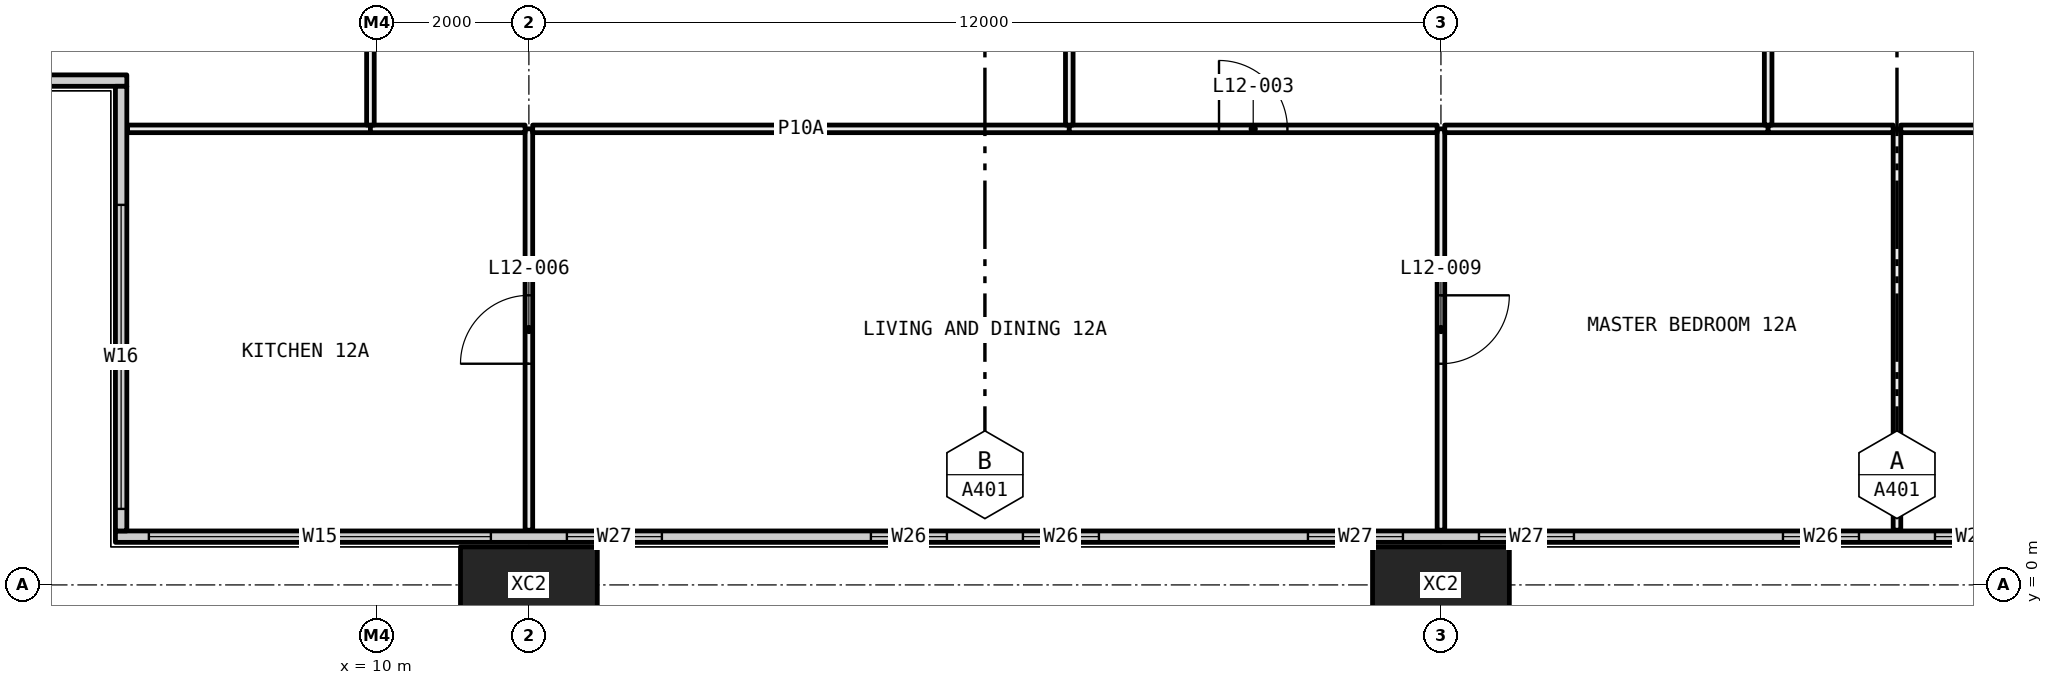
"""IFC4 building model, lengths in metres.
Left out: names, types, materials, properties, quantities, classifications, styles, units other than length and angle.
Written with IfcOpenShell. Run it as: python <this file> out.ifc"""

import sys

from ifc_helpers import new_model, si_unit, direction, frame, frame_2d, origin, origin_2d, place, context, subcontext, project, spatial, rectangle, hollow_rectangle, extrude, element, fill, save


model = new_model("IFC4")
c1 = context("Model", 3, precision=1e-05, world=origin(), true_north=direction((0.0, 1.0)))
c2 = subcontext(c1, "Body", "Model", "MODEL_VIEW")
j1 = project(units=[si_unit("LENGTHUNIT", "METRE"), si_unit("PLANEANGLEUNIT", "RADIAN")], contexts=[c1])
p1 = place(None, origin())
s1 = spatial("IfcSite", under=j1, at=p1, CompositionType="ELEMENT")
p2 = place(p1, origin())
s2 = spatial("IfcBuilding", under=s1, at=p2, CompositionType="ELEMENT")
p3 = place(p2, frame((0.0, 0.0, 54.15)))
s3 = spatial("IfcBuildingStorey", under=s2, at=p3, CompositionType="ELEMENT", Elevation=54.15)
for number, where, z_axis, x_axis in (
    (1, (12.0, 0.0, -0.4), (0.0, 0.0, 1.0), (1.0, 0.0, 0.0)),
    (2, (24.0, 0.0, -0.4), (0.0, 0.0, 1.0), (1.0, 0.0, 0.0)),
):
    element("IfcColumn", number, at=place(p3, frame(where, z_axis=z_axis, x_axis=x_axis)), inside=s3, PredefinedType="COLUMN", context=c2, shape_type="SweptSolid", body=[
        extrude(hollow_rectangle(XDim=1.8, YDim=1.0, WallThickness=0.07, at=origin_2d()), origin(), (0.0, 0.0, 1.0), 3.45),
    ])
p4 = place(p3, frame((6.56, 0.635, 0.0), z_axis=(0.0, 0.0, 1.0), x_axis=(1.0, 0.0, 0.0)))
e3 = element("IfcWall", 3, at=p4, inside=s3, PredefinedType="ELEMENTEDWALL", context=c2, shape_type="SweptSolid", body=[
    extrude(rectangle(XDim=58.88, YDim=0.15, at=frame_2d((29.44, 0.0))), origin(), (0.0, 0.0, 1.0), 3.05),
])
p5 = place(p4, frame((0.44, 0.0, 0.45)))
e4 = element("IfcOpeningElement", 4, at=p5, cuts=e3, PredefinedType="OPENING", context=c2, shape_type="SweptSolid", body=[
    extrude(rectangle(XDim=4.5, YDim=2.55, at=frame_2d((2.25, 1.275))), frame((0.0, 0.085, 0.0), z_axis=(0.0, -1.0, 0.0), x_axis=(1.0, 0.0, 0.0)), (0.0, 0.0, 1.0), 0.17),
])
p6 = place(p4, frame((5.94, 0.0, 0.45)))
e5 = element("IfcOpeningElement", 5, at=p6, cuts=e3, PredefinedType="OPENING", context=c2, shape_type="SweptSolid", body=[
    extrude(rectangle(XDim=1.25, YDim=2.55, at=frame_2d((0.625, 1.275))), frame((0.0, 0.085, 0.0), z_axis=(0.0, -1.0, 0.0), x_axis=(1.0, 0.0, 0.0)), (0.0, 0.0, 1.0), 0.17),
])
p7 = place(p4, frame((9.94, 0.0, 0.45)))
e6 = element("IfcOpeningElement", 6, at=p7, cuts=e3, PredefinedType="OPENING", context=c2, shape_type="SweptSolid", body=[
    extrude(rectangle(XDim=1.0, YDim=2.55, at=frame_2d((0.5, 1.275))), frame((0.0, 0.085, 0.0), z_axis=(0.0, -1.0, 0.0), x_axis=(1.0, 0.0, 0.0)), (0.0, 0.0, 1.0), 0.17),
])
p8 = place(p4, frame((11.94, 0.0, 0.45)))
e7 = element("IfcOpeningElement", 7, at=p8, cuts=e3, PredefinedType="OPENING", context=c2, shape_type="SweptSolid", body=[
    extrude(rectangle(XDim=1.0, YDim=2.55, at=frame_2d((0.5, 1.275))), frame((0.0, 0.085, 0.0), z_axis=(0.0, -1.0, 0.0), x_axis=(1.0, 0.0, 0.0)), (0.0, 0.0, 1.0), 0.17),
])
p9 = place(p4, frame((15.69, 0.0, 0.45)))
e8 = element("IfcOpeningElement", 8, at=p9, cuts=e3, PredefinedType="OPENING", context=c2, shape_type="SweptSolid", body=[
    extrude(rectangle(XDim=1.25, YDim=2.55, at=frame_2d((0.625, 1.275))), frame((0.0, 0.085, 0.0), z_axis=(0.0, -1.0, 0.0), x_axis=(1.0, 0.0, 0.0)), (0.0, 0.0, 1.0), 0.17),
])
p10 = place(p4, frame((17.94, 0.0, 0.45)))
e9 = element("IfcOpeningElement", 9, at=p10, cuts=e3, PredefinedType="OPENING", context=c2, shape_type="SweptSolid", body=[
    extrude(rectangle(XDim=1.25, YDim=2.55, at=frame_2d((0.625, 1.275))), frame((0.0, 0.085, 0.0), z_axis=(0.0, -1.0, 0.0), x_axis=(1.0, 0.0, 0.0)), (0.0, 0.0, 1.0), 0.17),
])
p11 = place(p4, frame((21.94, 0.0, 0.45)))
e10 = element("IfcOpeningElement", 10, at=p11, cuts=e3, PredefinedType="OPENING", context=c2, shape_type="SweptSolid", body=[
    extrude(rectangle(XDim=1.0, YDim=2.55, at=frame_2d((0.5, 1.275))), frame((0.0, 0.085, 0.0), z_axis=(0.0, -1.0, 0.0), x_axis=(1.0, 0.0, 0.0)), (0.0, 0.0, 1.0), 0.17),
])
p12 = place(p4, frame((23.94, 0.0, 0.45)))
e11 = element("IfcOpeningElement", 11, at=p12, cuts=e3, PredefinedType="OPENING", context=c2, shape_type="SweptSolid", body=[
    extrude(rectangle(XDim=1.0, YDim=2.55, at=frame_2d((0.5, 1.275))), frame((0.0, 0.085, 0.0), z_axis=(0.0, -1.0, 0.0), x_axis=(1.0, 0.0, 0.0)), (0.0, 0.0, 1.0), 0.17),
])
p13 = place(p4, frame((27.69, 0.0, 0.45)))
e12 = element("IfcOpeningElement", 12, at=p13, cuts=e3, PredefinedType="OPENING", context=c2, shape_type="SweptSolid", body=[
    extrude(rectangle(XDim=1.25, YDim=2.55, at=frame_2d((0.625, 1.275))), frame((0.0, 0.085, 0.0), z_axis=(0.0, -1.0, 0.0), x_axis=(1.0, 0.0, 0.0)), (0.0, 0.0, 1.0), 0.17),
])
p14 = place(p4, frame((29.94, 0.0, 0.45)))
e13 = element("IfcOpeningElement", 13, at=p14, cuts=e3, PredefinedType="OPENING", context=c2, shape_type="SweptSolid", body=[
    extrude(rectangle(XDim=1.25, YDim=2.55, at=frame_2d((0.625, 1.275))), frame((0.0, 0.085, 0.0), z_axis=(0.0, -1.0, 0.0), x_axis=(1.0, 0.0, 0.0)), (0.0, 0.0, 1.0), 0.17),
])
p15 = place(p4, frame((33.94, 0.0, 0.45)))
e14 = element("IfcOpeningElement", 14, at=p15, cuts=e3, PredefinedType="OPENING", context=c2, shape_type="SweptSolid", body=[
    extrude(rectangle(XDim=1.0, YDim=2.55, at=frame_2d((0.5, 1.275))), frame((0.0, 0.085, 0.0), z_axis=(0.0, -1.0, 0.0), x_axis=(1.0, 0.0, 0.0)), (0.0, 0.0, 1.0), 0.17),
])
p16 = place(p4, frame((35.94, 0.0, 0.45)))
e15 = element("IfcOpeningElement", 15, at=p16, cuts=e3, PredefinedType="OPENING", context=c2, shape_type="SweptSolid", body=[
    extrude(rectangle(XDim=1.0, YDim=2.55, at=frame_2d((0.5, 1.275))), frame((0.0, 0.085, 0.0), z_axis=(0.0, -1.0, 0.0), x_axis=(1.0, 0.0, 0.0)), (0.0, 0.0, 1.0), 0.17),
])
p17 = place(p4, frame((39.69, 0.0, 0.45)))
e16 = element("IfcOpeningElement", 16, at=p17, cuts=e3, PredefinedType="OPENING", context=c2, shape_type="SweptSolid", body=[
    extrude(rectangle(XDim=1.25, YDim=2.55, at=frame_2d((0.625, 1.275))), frame((0.0, 0.085, 0.0), z_axis=(0.0, -1.0, 0.0), x_axis=(1.0, 0.0, 0.0)), (0.0, 0.0, 1.0), 0.17),
])
p18 = place(p4, frame((41.94, 0.0, 0.45)))
e17 = element("IfcOpeningElement", 17, at=p18, cuts=e3, PredefinedType="OPENING", context=c2, shape_type="SweptSolid", body=[
    extrude(rectangle(XDim=1.25, YDim=2.55, at=frame_2d((0.625, 1.275))), frame((0.0, 0.085, 0.0), z_axis=(0.0, -1.0, 0.0), x_axis=(1.0, 0.0, 0.0)), (0.0, 0.0, 1.0), 0.17),
])
p19 = place(p4, frame((45.94, 0.0, 0.45)))
e18 = element("IfcOpeningElement", 18, at=p19, cuts=e3, PredefinedType="OPENING", context=c2, shape_type="SweptSolid", body=[
    extrude(rectangle(XDim=1.0, YDim=2.55, at=frame_2d((0.5, 1.275))), frame((0.0, 0.085, 0.0), z_axis=(0.0, -1.0, 0.0), x_axis=(1.0, 0.0, 0.0)), (0.0, 0.0, 1.0), 0.17),
])
p20 = place(p4, frame((47.94, 0.0, 0.45)))
e19 = element("IfcOpeningElement", 19, at=p20, cuts=e3, PredefinedType="OPENING", context=c2, shape_type="SweptSolid", body=[
    extrude(rectangle(XDim=1.0, YDim=2.55, at=frame_2d((0.5, 1.275))), frame((0.0, 0.085, 0.0), z_axis=(0.0, -1.0, 0.0), x_axis=(1.0, 0.0, 0.0)), (0.0, 0.0, 1.0), 0.17),
])
p21 = place(p4, frame((51.69, 0.0, 0.45)))
e20 = element("IfcOpeningElement", 20, at=p21, cuts=e3, PredefinedType="OPENING", context=c2, shape_type="SweptSolid", body=[
    extrude(rectangle(XDim=1.25, YDim=2.55, at=frame_2d((0.625, 1.275))), frame((0.0, 0.085, 0.0), z_axis=(0.0, -1.0, 0.0), x_axis=(1.0, 0.0, 0.0)), (0.0, 0.0, 1.0), 0.17),
])
p22 = place(p4, frame((53.94, 0.0, 0.45)))
e21 = element("IfcOpeningElement", 21, at=p22, cuts=e3, PredefinedType="OPENING", context=c2, shape_type="SweptSolid", body=[
    extrude(rectangle(XDim=4.5, YDim=2.55, at=frame_2d((2.25, 1.275))), frame((0.0, 0.085, 0.0), z_axis=(0.0, -1.0, 0.0), x_axis=(1.0, 0.0, 0.0)), (0.0, 0.0, 1.0), 0.17),
])
p23 = place(p3, frame((0.56, 6.635, 0.0), z_axis=(0.0, 0.0, 1.0), x_axis=(1.0, 0.0, 0.0)))
e22 = element("IfcWall", 22, at=p23, inside=s3, PredefinedType="ELEMENTEDWALL", context=c2, shape_type="SweptSolid", body=[
    extrude(rectangle(XDim=6.15, YDim=0.15, at=frame_2d((3.075, 0.0))), origin(), (0.0, 0.0, 1.0), 3.05),
])
p24 = place(p23, frame((0.44, 0.0, 0.45)))
e23 = element("IfcOpeningElement", 23, at=p24, cuts=e22, PredefinedType="OPENING", context=c2, shape_type="SweptSolid", body=[
    extrude(rectangle(XDim=4.0, YDim=2.55, at=frame_2d((2.0, 1.275))), frame((0.0, 0.085, 0.0), z_axis=(0.0, -1.0, 0.0), x_axis=(1.0, 0.0, 0.0)), (0.0, 0.0, 1.0), 0.17),
])
p25 = place(p3, frame((6.635, 0.71, 0.0), z_axis=(0.0, 0.0, 1.0), x_axis=(0.0, 1.0, 0.0)))
e24 = element("IfcWall", 24, at=p25, inside=s3, PredefinedType="ELEMENTEDWALL", context=c2, shape_type="SweptSolid", body=[
    extrude(rectangle(XDim=5.85, YDim=0.15, at=frame_2d((2.925, 0.0))), origin(), (0.0, 0.0, 1.0), 3.05),
])
p26 = place(p25, frame((0.29, 0.0, 0.45)))
e25 = element("IfcOpeningElement", 25, at=p26, cuts=e24, PredefinedType="OPENING", context=c2, shape_type="SweptSolid", body=[
    extrude(rectangle(XDim=4.0, YDim=2.55, at=frame_2d((2.0, 1.275))), frame((0.0, 0.085, 0.0), z_axis=(0.0, -1.0, 0.0), x_axis=(1.0, 0.0, 0.0)), (0.0, 0.0, 1.0), 0.17),
])
p27 = place(p3, frame((12.0, 0.72, 0.0), z_axis=(0.0, 0.0, 1.0), x_axis=(0.0, 1.0, 0.0)))
e26 = element("IfcWall", 26, at=p27, inside=s3, PredefinedType="PARTITIONING", context=c2, shape_type="SweptSolid", body=[
    extrude(rectangle(XDim=5.28, YDim=0.1, at=frame_2d((2.64, 0.0))), origin(), (0.0, 0.0, 1.0), 2.45),
])
p28 = place(p27, frame((2.19, 0.0, 0.0)))
e27 = element("IfcOpeningElement", 27, at=p28, cuts=e26, PredefinedType="OPENING", context=c2, shape_type="SweptSolid", body=[
    extrude(rectangle(XDim=0.9, YDim=2.1, at=frame_2d((0.45, 1.05))), frame((0.0, 0.06, 0.0), z_axis=(0.0, -1.0, 0.0), x_axis=(1.0, 0.0, 0.0)), (0.0, 0.0, 1.0), 0.12),
])
p29 = place(p3, frame((9.915, 6.0, 0.0), z_axis=(0.0, 0.0, 1.0), x_axis=(-1.0, 0.0, 0.0)))
e28 = element("IfcWall", 28, at=p29, inside=s3, PredefinedType="PARTITIONING", context=c2, shape_type="SweptSolid", body=[
    extrude(rectangle(XDim=3.195, YDim=0.1, at=frame_2d((1.598, 0.0))), origin(), (0.0, 0.0, 1.0), 3.05),
])
p30 = place(p3, frame((11.95, 6.0, 0.0), z_axis=(0.0, 0.0, 1.0), x_axis=(-1.0, 0.0, 0.0)))
e29 = element("IfcWall", 29, at=p30, inside=s3, PredefinedType="PARTITIONING", context=c2, shape_type="SweptSolid", body=[
    extrude(rectangle(XDim=2.035, YDim=0.1, at=frame_2d((1.018, 0.0))), origin(), (0.0, 0.0, 1.0), 2.45),
])
p31 = place(p3, frame((24.0, 0.72, 0.0), z_axis=(0.0, 0.0, 1.0), x_axis=(0.0, 1.0, 0.0)))
e30 = element("IfcWall", 30, at=p31, inside=s3, PredefinedType="PARTITIONING", context=c2, shape_type="SweptSolid", body=[
    extrude(rectangle(XDim=5.28, YDim=0.1, at=frame_2d((2.64, 0.0))), origin(), (0.0, 0.0, 1.0), 2.45),
])
p32 = place(p31, frame((2.19, 0.0, 0.0)))
e31 = element("IfcOpeningElement", 31, at=p32, cuts=e30, PredefinedType="OPENING", context=c2, shape_type="SweptSolid", body=[
    extrude(rectangle(XDim=0.9, YDim=2.1, at=frame_2d((0.45, 1.05))), frame((0.0, 0.06, 0.0), z_axis=(0.0, -1.0, 0.0), x_axis=(1.0, 0.0, 0.0)), (0.0, 0.0, 1.0), 0.12),
])
p33 = place(p3, frame((19.11, 6.0, 0.0), z_axis=(0.0, 0.0, 1.0), x_axis=(-1.0, 0.0, 0.0)))
e32 = element("IfcWall", 32, at=p33, inside=s3, PredefinedType="PARTITIONING", context=c2, shape_type="SweptSolid", body=[
    extrude(rectangle(XDim=7.06, YDim=0.1, at=frame_2d((3.53, 0.0))), origin(), (0.0, 0.0, 1.0), 2.45),
])
p34 = place(p3, frame((23.95, 6.0, 0.0), z_axis=(0.0, 0.0, 1.0), x_axis=(-1.0, 0.0, 0.0)))
e33 = element("IfcWall", 33, at=p34, inside=s3, PredefinedType="PARTITIONING", context=c2, shape_type="SweptSolid", body=[
    extrude(rectangle(XDim=4.84, YDim=0.1, at=frame_2d((2.42, 0.0))), origin(), (0.0, 0.0, 1.0), 2.45),
])
p35 = place(p34, frame((1.97, 0.0, 0.0)))
e34 = element("IfcOpeningElement", 34, at=p35, cuts=e33, PredefinedType="OPENING", context=c2, shape_type="SweptSolid", body=[
    extrude(rectangle(XDim=0.9, YDim=2.1, at=frame_2d((0.45, 1.05))), frame((0.0, 0.06, 0.0), z_axis=(0.0, -1.0, 0.0), x_axis=(1.0, 0.0, 0.0)), (0.0, 0.0, 1.0), 0.12),
])
p36 = place(p3, frame((30.0, 0.72, 0.0), z_axis=(0.0, 0.0, 1.0), x_axis=(0.0, 1.0, 0.0)))
e35 = element("IfcWall", 35, at=p36, inside=s3, PredefinedType="PARTITIONING", context=c2, shape_type="SweptSolid", body=[
    extrude(rectangle(XDim=5.28, YDim=0.1, at=frame_2d((2.64, 0.0))), origin(), (0.0, 0.0, 1.0), 3.05),
])
p37 = place(p3, frame((28.305, 6.0, 0.0), z_axis=(0.0, 0.0, 1.0), x_axis=(-1.0, 0.0, 0.0)))
e36 = element("IfcWall", 36, at=p37, inside=s3, PredefinedType="PARTITIONING", context=c2, shape_type="SweptSolid", body=[
    extrude(rectangle(XDim=4.255, YDim=0.1, at=frame_2d((2.127, 0.0))), origin(), (0.0, 0.0, 1.0), 2.45),
])
p38 = place(p3, frame((29.95, 6.0, 0.0), z_axis=(0.0, 0.0, 1.0), x_axis=(-1.0, 0.0, 0.0)))
e37 = element("IfcWall", 37, at=p38, inside=s3, PredefinedType="PARTITIONING", context=c2, shape_type="SweptSolid", body=[
    extrude(rectangle(XDim=1.645, YDim=0.1, at=frame_2d((0.823, 0.0))), origin(), (0.0, 0.0, 1.0), 3.05),
])
p39 = place(p3, frame((35.95, 6.0, 0.0), z_axis=(0.0, 0.0, 1.0), x_axis=(-1.0, 0.0, 0.0)))
e38 = element("IfcWall", 38, at=p39, inside=s3, PredefinedType="PARTITIONING", context=c2, shape_type="SweptSolid", body=[
    extrude(rectangle(XDim=5.9, YDim=0.1, at=frame_2d((2.95, 0.0))), origin(), (0.0, 0.0, 1.0), 2.45),
])
p40 = place(p39, frame((2.5, 0.0, 0.0)))
e39 = element("IfcOpeningElement", 39, at=p40, cuts=e38, PredefinedType="OPENING", context=c2, shape_type="SweptSolid", body=[
    extrude(rectangle(XDim=0.9, YDim=2.1, at=frame_2d((0.45, 1.05))), frame((0.0, 0.06, 0.0), z_axis=(0.0, -1.0, 0.0), x_axis=(1.0, 0.0, 0.0)), (0.0, 0.0, 1.0), 0.12),
])
p41 = place(p3, frame((9.915, 6.05, 0.0), z_axis=(0.0, 0.0, 1.0), x_axis=(0.0, 1.0, 0.0)))
e40 = element("IfcWall", 40, at=p41, inside=s3, PredefinedType="PARTITIONING", context=c2, shape_type="SweptSolid", body=[
    extrude(rectangle(XDim=5.875, YDim=0.1, at=frame_2d((2.938, 0.0))), origin(), (0.0, 0.0, 1.0), 2.45),
])
p42 = place(p41, frame((2.488, 0.0, 0.0)))
e41 = element("IfcOpeningElement", 41, at=p42, cuts=e40, PredefinedType="OPENING", context=c2, shape_type="SweptSolid", body=[
    extrude(rectangle(XDim=0.9, YDim=2.1, at=frame_2d((0.45, 1.05))), frame((0.0, 0.06, 0.0), z_axis=(0.0, -1.0, 0.0), x_axis=(1.0, 0.0, 0.0)), (0.0, 0.0, 1.0), 0.12),
])
p43 = place(p3, frame((19.11, 6.05, 0.0), z_axis=(0.0, 0.0, 1.0), x_axis=(0.0, 1.0, 0.0)))
e42 = element("IfcWall", 42, at=p43, inside=s3, PredefinedType="PARTITIONING", context=c2, shape_type="SweptSolid", body=[
    extrude(rectangle(XDim=5.95, YDim=0.1, at=frame_2d((2.975, 0.0))), origin(), (0.0, 0.0, 1.0), 2.45),
])
p44 = place(p43, frame((2.525, 0.0, 0.0)))
e43 = element("IfcOpeningElement", 43, at=p44, cuts=e42, PredefinedType="OPENING", context=c2, shape_type="SweptSolid", body=[
    extrude(rectangle(XDim=0.9, YDim=2.1, at=frame_2d((0.45, 1.05))), frame((0.0, 0.06, 0.0), z_axis=(0.0, -1.0, 0.0), x_axis=(1.0, 0.0, 0.0)), (0.0, 0.0, 1.0), 0.12),
])
p45 = place(p3, frame((28.305, 6.05, 0.0), z_axis=(0.0, 0.0, 1.0), x_axis=(0.0, 1.0, 0.0)))
e44 = element("IfcWall", 44, at=p45, inside=s3, PredefinedType="PARTITIONING", context=c2, shape_type="SweptSolid", body=[
    extrude(rectangle(XDim=5.95, YDim=0.1, at=frame_2d((2.975, 0.0))), origin(), (0.0, 0.0, 1.0), 2.45),
])
p46 = place(p45, frame((2.525, 0.0, 0.0)))
e45 = element("IfcOpeningElement", 45, at=p46, cuts=e44, PredefinedType="OPENING", context=c2, shape_type="SweptSolid", body=[
    extrude(rectangle(XDim=0.9, YDim=2.1, at=frame_2d((0.45, 1.05))), frame((0.0, 0.06, 0.0), z_axis=(0.0, -1.0, 0.0), x_axis=(1.0, 0.0, 0.0)), (0.0, 0.0, 1.0), 0.12),
])
p47 = place(p5, origin())
e46 = element("IfcWindow", 46, at=p47, inside=s3, PartitioningType="SINGLE_PANEL", PredefinedType="WINDOW", context=c2, shape_type="SweptSolid", body=[
    extrude(rectangle(XDim=4.5, YDim=2.55, at=frame_2d((2.25, 1.275))), frame((0.0, 0.03, 0.0), z_axis=(0.0, -1.0, 0.0), x_axis=(1.0, 0.0, 0.0)), (0.0, 0.0, 1.0), 0.06),
])
fill(e4, e46)
p48 = place(p6, origin())
e47 = element("IfcWindow", 47, at=p48, inside=s3, PartitioningType="SINGLE_PANEL", PredefinedType="WINDOW", context=c2, shape_type="SweptSolid", body=[
    extrude(rectangle(XDim=1.25, YDim=2.55, at=frame_2d((0.625, 1.275))), frame((0.0, 0.03, 0.0), z_axis=(0.0, -1.0, 0.0), x_axis=(1.0, 0.0, 0.0)), (0.0, 0.0, 1.0), 0.06),
])
fill(e5, e47)
p49 = place(p7, origin())
e48 = element("IfcWindow", 48, at=p49, inside=s3, PartitioningType="SINGLE_PANEL", PredefinedType="WINDOW", context=c2, shape_type="SweptSolid", body=[
    extrude(rectangle(XDim=1.0, YDim=2.55, at=frame_2d((0.5, 1.275))), frame((0.0, 0.03, 0.0), z_axis=(0.0, -1.0, 0.0), x_axis=(1.0, 0.0, 0.0)), (0.0, 0.0, 1.0), 0.06),
])
fill(e6, e48)
p50 = place(p8, origin())
e49 = element("IfcWindow", 49, at=p50, inside=s3, PartitioningType="SINGLE_PANEL", PredefinedType="WINDOW", context=c2, shape_type="SweptSolid", body=[
    extrude(rectangle(XDim=1.0, YDim=2.55, at=frame_2d((0.5, 1.275))), frame((0.0, 0.03, 0.0), z_axis=(0.0, -1.0, 0.0), x_axis=(1.0, 0.0, 0.0)), (0.0, 0.0, 1.0), 0.06),
])
fill(e7, e49)
p51 = place(p9, origin())
e50 = element("IfcWindow", 50, at=p51, inside=s3, PartitioningType="SINGLE_PANEL", PredefinedType="WINDOW", context=c2, shape_type="SweptSolid", body=[
    extrude(rectangle(XDim=1.25, YDim=2.55, at=frame_2d((0.625, 1.275))), frame((0.0, 0.03, 0.0), z_axis=(0.0, -1.0, 0.0), x_axis=(1.0, 0.0, 0.0)), (0.0, 0.0, 1.0), 0.06),
])
fill(e8, e50)
p52 = place(p10, origin())
e51 = element("IfcWindow", 51, at=p52, inside=s3, PartitioningType="SINGLE_PANEL", PredefinedType="WINDOW", context=c2, shape_type="SweptSolid", body=[
    extrude(rectangle(XDim=1.25, YDim=2.55, at=frame_2d((0.625, 1.275))), frame((0.0, 0.03, 0.0), z_axis=(0.0, -1.0, 0.0), x_axis=(1.0, 0.0, 0.0)), (0.0, 0.0, 1.0), 0.06),
])
fill(e9, e51)
p53 = place(p11, origin())
e52 = element("IfcWindow", 52, at=p53, inside=s3, PartitioningType="SINGLE_PANEL", PredefinedType="WINDOW", context=c2, shape_type="SweptSolid", body=[
    extrude(rectangle(XDim=1.0, YDim=2.55, at=frame_2d((0.5, 1.275))), frame((0.0, 0.03, 0.0), z_axis=(0.0, -1.0, 0.0), x_axis=(1.0, 0.0, 0.0)), (0.0, 0.0, 1.0), 0.06),
])
fill(e10, e52)
p54 = place(p12, origin())
e53 = element("IfcWindow", 53, at=p54, inside=s3, PartitioningType="SINGLE_PANEL", PredefinedType="WINDOW", context=c2, shape_type="SweptSolid", body=[
    extrude(rectangle(XDim=1.0, YDim=2.55, at=frame_2d((0.5, 1.275))), frame((0.0, 0.03, 0.0), z_axis=(0.0, -1.0, 0.0), x_axis=(1.0, 0.0, 0.0)), (0.0, 0.0, 1.0), 0.06),
])
fill(e11, e53)
p55 = place(p26, origin())
e54 = element("IfcWindow", 54, at=p55, inside=s3, PartitioningType="SINGLE_PANEL", PredefinedType="WINDOW", context=c2, shape_type="SweptSolid", body=[
    extrude(rectangle(XDim=4.0, YDim=2.55, at=frame_2d((2.0, 1.275))), frame((0.0, 0.03, 0.0), z_axis=(0.0, -1.0, 0.0), x_axis=(1.0, 0.0, 0.0)), (0.0, 0.0, 1.0), 0.06),
])
fill(e25, e54)
p56 = place(p35, frame((0.9, 0.0, 0.0), x_axis=(-1.0, 0.0, 0.0)))
e55 = element("IfcDoor", 55, at=p56, inside=s3, OperationType="SINGLE_SWING_RIGHT", PredefinedType="DOOR", context=c2, shape_type="SweptSolid", body=[
    extrude(rectangle(XDim=0.9, YDim=2.1, at=frame_2d((0.45, 1.05))), frame((0.0, 0.025, 0.0), z_axis=(0.0, -1.0, 0.0), x_axis=(1.0, 0.0, 0.0)), (0.0, 0.0, 1.0), 0.05),
])
fill(e34, e55)
p57 = place(p28, origin())
e56 = element("IfcDoor", 56, at=p57, inside=s3, OperationType="SINGLE_SWING_RIGHT", PredefinedType="DOOR", context=c2, shape_type="SweptSolid", body=[
    extrude(rectangle(XDim=0.9, YDim=2.1, at=frame_2d((0.45, 1.05))), frame((0.0, 0.025, 0.0), z_axis=(0.0, -1.0, 0.0), x_axis=(1.0, 0.0, 0.0)), (0.0, 0.0, 1.0), 0.05),
])
fill(e27, e56)
p58 = place(p32, frame((0.9, 0.0, 0.0), x_axis=(-1.0, 0.0, 0.0)))
e57 = element("IfcDoor", 57, at=p58, inside=s3, OperationType="SINGLE_SWING_RIGHT", PredefinedType="DOOR", context=c2, shape_type="SweptSolid", body=[
    extrude(rectangle(XDim=0.9, YDim=2.1, at=frame_2d((0.45, 1.05))), frame((0.0, 0.025, 0.0), z_axis=(0.0, -1.0, 0.0), x_axis=(1.0, 0.0, 0.0)), (0.0, 0.0, 1.0), 0.05),
])
fill(e31, e57)
save(model, sys.argv[1])
